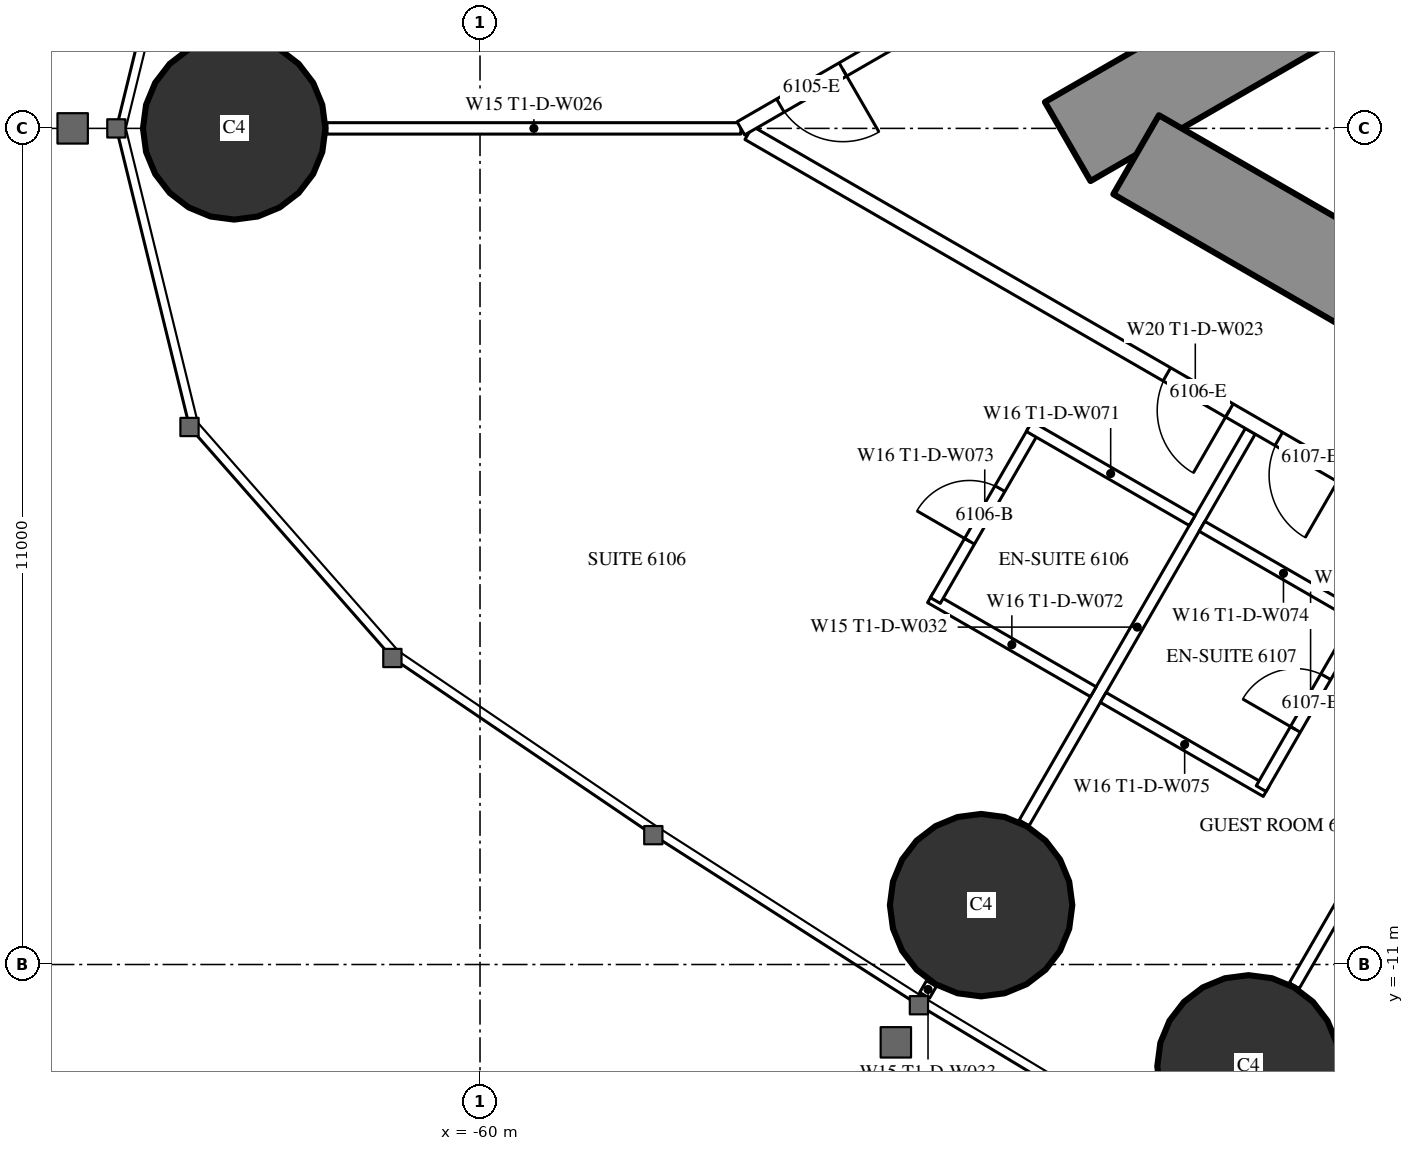
"""IFC4 building model, lengths in metres.
Left out: names, types, materials, properties, quantities, classifications, styles, units other than length and angle.
Written with IfcOpenShell. Run it as: python <this file> out.ifc"""

import sys

from ifc_helpers import new_model, si_unit, direction, frame, frame_2d, origin, origin_2d, place, context, subcontext, project, spatial, rectangle, circle, extrude, element, fill, save


model = new_model("IFC4")
c1 = context("Model", 3, precision=1e-05, world=origin(), true_north=direction((0.0, 1.0)))
c2 = subcontext(c1, "Body", "Model", "MODEL_VIEW")
j1 = project(units=[si_unit("LENGTHUNIT", "METRE"), si_unit("PLANEANGLEUNIT", "RADIAN")], contexts=[c1])
p1 = place(None, origin())
s1 = spatial("IfcSite", under=j1, at=p1, CompositionType="ELEMENT")
p2 = place(p1, origin())
s2 = spatial("IfcBuilding", under=s1, at=p2, CompositionType="ELEMENT")
p3 = place(p2, frame((0.0, 0.0, 229.7)))
s3 = spatial("IfcBuildingStorey", under=s2, at=p3, CompositionType="ELEMENT", Elevation=229.7)
for number, where, z_axis, x_axis in (
    (1, (-63.234, 0.0, 0.0), (0.0, 0.0, 1.0), (1.0, 0.0, 0.0)),
    (2, (-53.408, -10.219, 0.0), (0.0, 0.0, 1.0), (1.0, 0.0, 0.0)),
    (3, (-49.89, -12.34, 0.0), (0.0, 0.0, 1.0), (1.0, 0.0, 0.0)),
):
    element("IfcColumn", number, at=place(p3, frame(where, z_axis=z_axis, x_axis=x_axis)), inside=s3, PredefinedType="COLUMN", context=c2, shape_type="SweptSolid", body=[
        extrude(circle(Radius=1.2, at=origin_2d()), origin(), (0.0, 0.0, 1.0), 3.6),
    ])
p4 = place(p3, frame((-27.2, 14.3, 0.0), z_axis=(0.0, 0.0, 1.0), x_axis=(-0.866026593062, -0.499997940104, 0.0)))
e4 = element("IfcWall", 4, at=p4, inside=s3, PredefinedType="SHEAR", context=c2, shape_type="SweptSolid", body=[
    extrude(rectangle(XDim=28.946, YDim=1.2, at=frame_2d((14.473, 0.0))), origin(), (0.0, 0.0, 1.0), 3.6),
])
p5 = place(p4, frame((4.6, 0.0, 0.0)))
e5 = element("IfcOpeningElement", 5, at=p5, cuts=e4, PredefinedType="OPENING", context=c2, shape_type="SweptSolid", body=[
    extrude(rectangle(XDim=1.0, YDim=2.2, at=frame_2d((0.5, 1.1))), frame((0.0, 0.61, 0.0), z_axis=(0.0, -1.0, 0.0), x_axis=(1.0, 0.0, 0.0)), (0.0, 0.0, 1.0), 1.22),
])
p6 = place(p4, frame((13.395, 0.0, 0.0)))
e6 = element("IfcOpeningElement", 6, at=p6, cuts=e4, PredefinedType="OPENING", context=c2, shape_type="SweptSolid", body=[
    extrude(rectangle(XDim=1.8, YDim=2.2, at=frame_2d((0.9, 1.1))), frame((0.0, 0.61, 0.0), z_axis=(0.0, -1.0, 0.0), x_axis=(1.0, 0.0, 0.0)), (0.0, 0.0, 1.0), 1.22),
])
p7 = place(p3, frame((-27.2, -14.3, 0.0), z_axis=(0.0, 0.0, 1.0), x_axis=(-0.866024021859, 0.500002393557, 0.0)))
e7 = element("IfcWall", 7, at=p7, inside=s3, PredefinedType="SHEAR", context=c2, shape_type="SweptSolid", body=[
    extrude(rectangle(XDim=27.907, YDim=1.2, at=frame_2d((13.954, 0.0))), origin(), (0.0, 0.0, 1.0), 3.6),
])
p8 = place(p7, frame((4.6, 0.0, 0.0)))
e8 = element("IfcOpeningElement", 8, at=p8, cuts=e7, PredefinedType="OPENING", context=c2, shape_type="SweptSolid", body=[
    extrude(rectangle(XDim=1.0, YDim=2.2, at=frame_2d((0.5, 1.1))), frame((0.0, 0.61, 0.0), z_axis=(0.0, -1.0, 0.0), x_axis=(1.0, 0.0, 0.0)), (0.0, 0.0, 1.0), 1.22),
])
p9 = place(p7, frame((13.395, 0.0, 0.0)))
e9 = element("IfcOpeningElement", 9, at=p9, cuts=e7, PredefinedType="OPENING", context=c2, shape_type="SweptSolid", body=[
    extrude(rectangle(XDim=1.8, YDim=2.2, at=frame_2d((0.9, 1.1))), frame((0.0, 0.61, 0.0), z_axis=(0.0, -1.0, 0.0), x_axis=(1.0, 0.0, 0.0)), (0.0, 0.0, 1.0), 1.22),
])
p10 = place(p3, frame((-46.274, -6.059, 0.0), z_axis=(0.0, 0.0, 1.0), x_axis=(-0.500020471368, -0.866013584312, 0.0)))
e10 = element("IfcWall", 10, at=p10, inside=s3, PredefinedType="PARTITIONING", context=c2, shape_type="SweptSolid", body=[
    extrude(rectangle(XDim=6.028, YDim=0.15, at=frame_2d((3.014, 0.0))), origin(), (0.0, 0.0, 1.0), 2.45),
])
p11 = place(p3, frame((-49.866, -3.985, 0.0), z_axis=(0.0, 0.0, 1.0), x_axis=(-0.500000694566, -0.866025002776, 0.0)))
e11 = element("IfcWall", 11, at=p11, inside=s3, PredefinedType="PARTITIONING", context=c2, shape_type="SweptSolid", body=[
    extrude(rectangle(XDim=5.95, YDim=0.15, at=frame_2d((2.975, 0.0))), origin(), (0.0, 0.0, 1.0), 2.45),
])
p12 = place(p3, frame((-54.061, -11.25, 0.0), z_axis=(0.0, 0.0, 1.0), x_axis=(-0.500391173478, -0.865799441849, 0.0)))
e12 = element("IfcWall", 12, at=p12, inside=s3, PredefinedType="PARTITIONING", context=c2, shape_type="SweptSolid", body=[
    extrude(rectangle(XDim=0.179, YDim=0.15, at=frame_2d((0.089, 0.0))), origin(), (0.0, 0.0, 1.0), 2.45),
])
p13 = place(p3, frame((-56.568, 0.0, 0.0), z_axis=(0.0, 0.0, 1.0), x_axis=(-1.0, 0.0, 0.0)))
e13 = element("IfcWall", 13, at=p13, inside=s3, PredefinedType="PARTITIONING", context=c2, shape_type="SweptSolid", body=[
    extrude(rectangle(XDim=5.446, YDim=0.15, at=frame_2d((2.723, 0.0))), origin(), (0.0, 0.0, 1.0), 2.45),
])
p14 = place(p3, frame((-44.715, -6.844, 0.0), z_axis=(0.0, 0.0, 1.0), x_axis=(-0.866025261224, 0.500000246922, 0.0)))
e14 = element("IfcWall", 14, at=p14, inside=s3, PredefinedType="PARTITIONING", context=c2, shape_type="SweptSolid", body=[
    extrude(rectangle(XDim=13.567, YDim=0.2, at=frame_2d((6.783, 0.0))), origin(), (0.0, 0.0, 1.0), 3.35),
])
p15 = place(p14, frame((6.266, 0.0, 0.0)))
e15 = element("IfcOpeningElement", 15, at=p15, cuts=e14, PredefinedType="OPENING", context=c2, shape_type="SweptSolid", body=[
    extrude(rectangle(XDim=0.95, YDim=2.2, at=frame_2d((0.475, 1.1))), frame((0.0, 0.11, 0.0), z_axis=(0.0, -1.0, 0.0), x_axis=(1.0, 0.0, 0.0)), (0.0, 0.0, 1.0), 0.22),
])
p16 = place(p14, frame((4.565, 0.0, 0.0)))
e16 = element("IfcOpeningElement", 16, at=p16, cuts=e14, PredefinedType="OPENING", context=c2, shape_type="SweptSolid", body=[
    extrude(rectangle(XDim=0.95, YDim=2.2, at=frame_2d((0.475, 1.1))), frame((0.0, 0.11, 0.0), z_axis=(0.0, -1.0, 0.0), x_axis=(1.0, 0.0, 0.0)), (0.0, 0.0, 1.0), 0.22),
])
p17 = place(p14, frame((0.5, 0.0, 0.0)))
e17 = element("IfcOpeningElement", 17, at=p17, cuts=e14, PredefinedType="OPENING", context=c2, shape_type="SweptSolid", body=[
    extrude(rectangle(XDim=0.967, YDim=2.2, at=frame_2d((0.483, 1.1))), frame((0.0, 0.11, 0.0), z_axis=(0.0, -1.0, 0.0), x_axis=(1.0, 0.0, 0.0)), (0.0, 0.0, 1.0), 0.22),
])
p18 = place(p3, frame((-51.931, -7.411, 0.0), z_axis=(0.0, 0.0, 1.0), x_axis=(-0.866006523861, 0.500032699561, 0.0)))
e18 = element("IfcWall", 18, at=p18, inside=s3, PredefinedType="PARTITIONING", context=c2, shape_type="SweptSolid", body=[
    extrude(rectangle(XDim=2.475, YDim=0.15, at=frame_2d((1.237, 0.0))), origin(), (0.0, 0.0, 1.0), 3.35),
])
p19 = place(p3, frame((-52.71, -3.96, 0.0), z_axis=(0.0, 0.0, 1.0), x_axis=(-0.500006934395, -0.866021400173, 0.0)))
e19 = element("IfcWall", 19, at=p19, inside=s3, PredefinedType="PARTITIONING", context=c2, shape_type="SweptSolid", body=[
    extrude(rectangle(XDim=2.6, YDim=0.15, at=frame_2d((1.3, 0.0))), origin(), (0.0, 0.0, 1.0), 3.35),
])
p20 = place(p19, frame((0.9, 0.0, 0.0)))
e20 = element("IfcOpeningElement", 20, at=p20, cuts=e19, PredefinedType="OPENING", context=c2, shape_type="SweptSolid", body=[
    extrude(rectangle(XDim=0.8, YDim=2.2, at=frame_2d((0.4, 1.1))), frame((0.0, 0.085, 0.0), z_axis=(0.0, -1.0, 0.0), x_axis=(1.0, 0.0, 0.0)), (0.0, 0.0, 1.0), 0.17),
])
p21 = place(p3, frame((-50.631, -5.16, 0.0), z_axis=(0.0, 0.0, 1.0), x_axis=(-0.86604923931, 0.499958713387, 0.0)))
e21 = element("IfcWall", 21, at=p21, inside=s3, PredefinedType="PARTITIONING", context=c2, shape_type="SweptSolid", body=[
    extrude(rectangle(XDim=2.475, YDim=0.15, at=frame_2d((1.237, 0.0))), origin(), (0.0, 0.0, 1.0), 2.5),
])
p22 = place(p3, frame((-49.658, -8.724, 0.0), z_axis=(0.0, 0.0, 1.0), x_axis=(-0.866031185235, 0.4999899861, 0.0)))
e22 = element("IfcWall", 22, at=p22, inside=s3, PredefinedType="PARTITIONING", context=c2, shape_type="SweptSolid", body=[
    extrude(rectangle(XDim=2.475, YDim=0.15, at=frame_2d((1.238, 0.0))), origin(), (0.0, 0.0, 1.0), 3.35),
])
p23 = place(p3, frame((-48.423, -6.435, 0.0), z_axis=(0.0, 0.0, 1.0), x_axis=(-0.500006934395, -0.866021400173, 0.0)))
e23 = element("IfcWall", 23, at=p23, inside=s3, PredefinedType="PARTITIONING", context=c2, shape_type="SweptSolid", body=[
    extrude(rectangle(XDim=2.6, YDim=0.15, at=frame_2d((1.3, 0.0))), origin(), (0.0, 0.0, 1.0), 3.35),
])
p24 = place(p23, frame((0.9, 0.0, 0.0)))
e24 = element("IfcOpeningElement", 24, at=p24, cuts=e23, PredefinedType="OPENING", context=c2, shape_type="SweptSolid", body=[
    extrude(rectangle(XDim=0.8, YDim=2.2, at=frame_2d((0.4, 1.1))), frame((0.0, 0.085, 0.0), z_axis=(0.0, -1.0, 0.0), x_axis=(1.0, 0.0, 0.0)), (0.0, 0.0, 1.0), 0.17),
])
p25 = place(p3, frame((-48.358, -6.472, 0.0), z_axis=(0.0, 0.0, 1.0), x_axis=(-0.866073894602, 0.499916002032, 0.0)))
e25 = element("IfcWall", 25, at=p25, inside=s3, PredefinedType="PARTITIONING", context=c2, shape_type="SweptSolid", body=[
    extrude(rectangle(XDim=2.475, YDim=0.15, at=frame_2d((1.238, 0.0))), origin(), (0.0, 0.0, 1.0), 2.5),
])
p26 = place(p3, frame((-49.816, 3.898, 0.0), z_axis=(0.0, 0.0, 1.0), x_axis=(-0.866028102716, -0.499995325284, 0.0)))
e26 = element("IfcWall", 26, at=p26, inside=s3, PredefinedType="PARTITIONING", context=c2, shape_type="SweptSolid", body=[
    extrude(rectangle(XDim=7.796, YDim=0.2, at=frame_2d((3.898, 0.0))), origin(), (0.0, 0.0, 1.0), 3.35),
])
p27 = place(p26, frame((6.246, 0.0, 0.0)))
e27 = element("IfcOpeningElement", 27, at=p27, cuts=e26, PredefinedType="OPENING", context=c2, shape_type="SweptSolid", body=[
    extrude(rectangle(XDim=0.95, YDim=2.2, at=frame_2d((0.475, 1.1))), frame((0.0, 0.11, 0.0), z_axis=(0.0, -1.0, 0.0), x_axis=(1.0, 0.0, 0.0)), (0.0, 0.0, 1.0), 0.22),
])
p28 = place(p27, origin())
e28 = element("IfcDoor", 28, at=p28, inside=s3, OperationType="SINGLE_SWING_LEFT", PredefinedType="DOOR", context=c2, shape_type="SweptSolid", body=[
    extrude(rectangle(XDim=0.95, YDim=2.2, at=frame_2d((0.475, 1.1))), frame((0.0, 0.025, 0.0), z_axis=(0.0, -1.0, 0.0), x_axis=(1.0, 0.0, 0.0)), (0.0, 0.0, 1.0), 0.05),
])
fill(e27, e28)
p29 = place(p20, origin())
e29 = element("IfcDoor", 29, at=p29, inside=s3, OperationType="SINGLE_SWING_RIGHT", PredefinedType="DOOR", context=c2, shape_type="SweptSolid", body=[
    extrude(rectangle(XDim=0.8, YDim=2.2, at=frame_2d((0.4, 1.1))), frame((0.0, 0.025, 0.0), z_axis=(0.0, -1.0, 0.0), x_axis=(1.0, 0.0, 0.0)), (0.0, 0.0, 1.0), 0.05),
])
fill(e20, e29)
p30 = place(p15, origin())
e30 = element("IfcDoor", 30, at=p30, inside=s3, OperationType="SINGLE_SWING_LEFT", PredefinedType="DOOR", context=c2, shape_type="SweptSolid", body=[
    extrude(rectangle(XDim=0.95, YDim=2.2, at=frame_2d((0.475, 1.1))), frame((0.0, 0.025, 0.0), z_axis=(0.0, -1.0, 0.0), x_axis=(1.0, 0.0, 0.0)), (0.0, 0.0, 1.0), 0.05),
])
fill(e15, e30)
p31 = place(p24, origin())
e31 = element("IfcDoor", 31, at=p31, inside=s3, OperationType="SINGLE_SWING_RIGHT", PredefinedType="DOOR", context=c2, shape_type="SweptSolid", body=[
    extrude(rectangle(XDim=0.8, YDim=2.2, at=frame_2d((0.4, 1.1))), frame((0.0, 0.025, 0.0), z_axis=(0.0, -1.0, 0.0), x_axis=(1.0, 0.0, 0.0)), (0.0, 0.0, 1.0), 0.05),
])
fill(e24, e31)
p32 = place(p16, origin())
e32 = element("IfcDoor", 32, at=p32, inside=s3, OperationType="SINGLE_SWING_LEFT", PredefinedType="DOOR", context=c2, shape_type="SweptSolid", body=[
    extrude(rectangle(XDim=0.95, YDim=2.2, at=frame_2d((0.475, 1.1))), frame((0.0, 0.025, 0.0), z_axis=(0.0, -1.0, 0.0), x_axis=(1.0, 0.0, 0.0)), (0.0, 0.0, 1.0), 0.05),
])
fill(e16, e32)
save(model, sys.argv[1])
